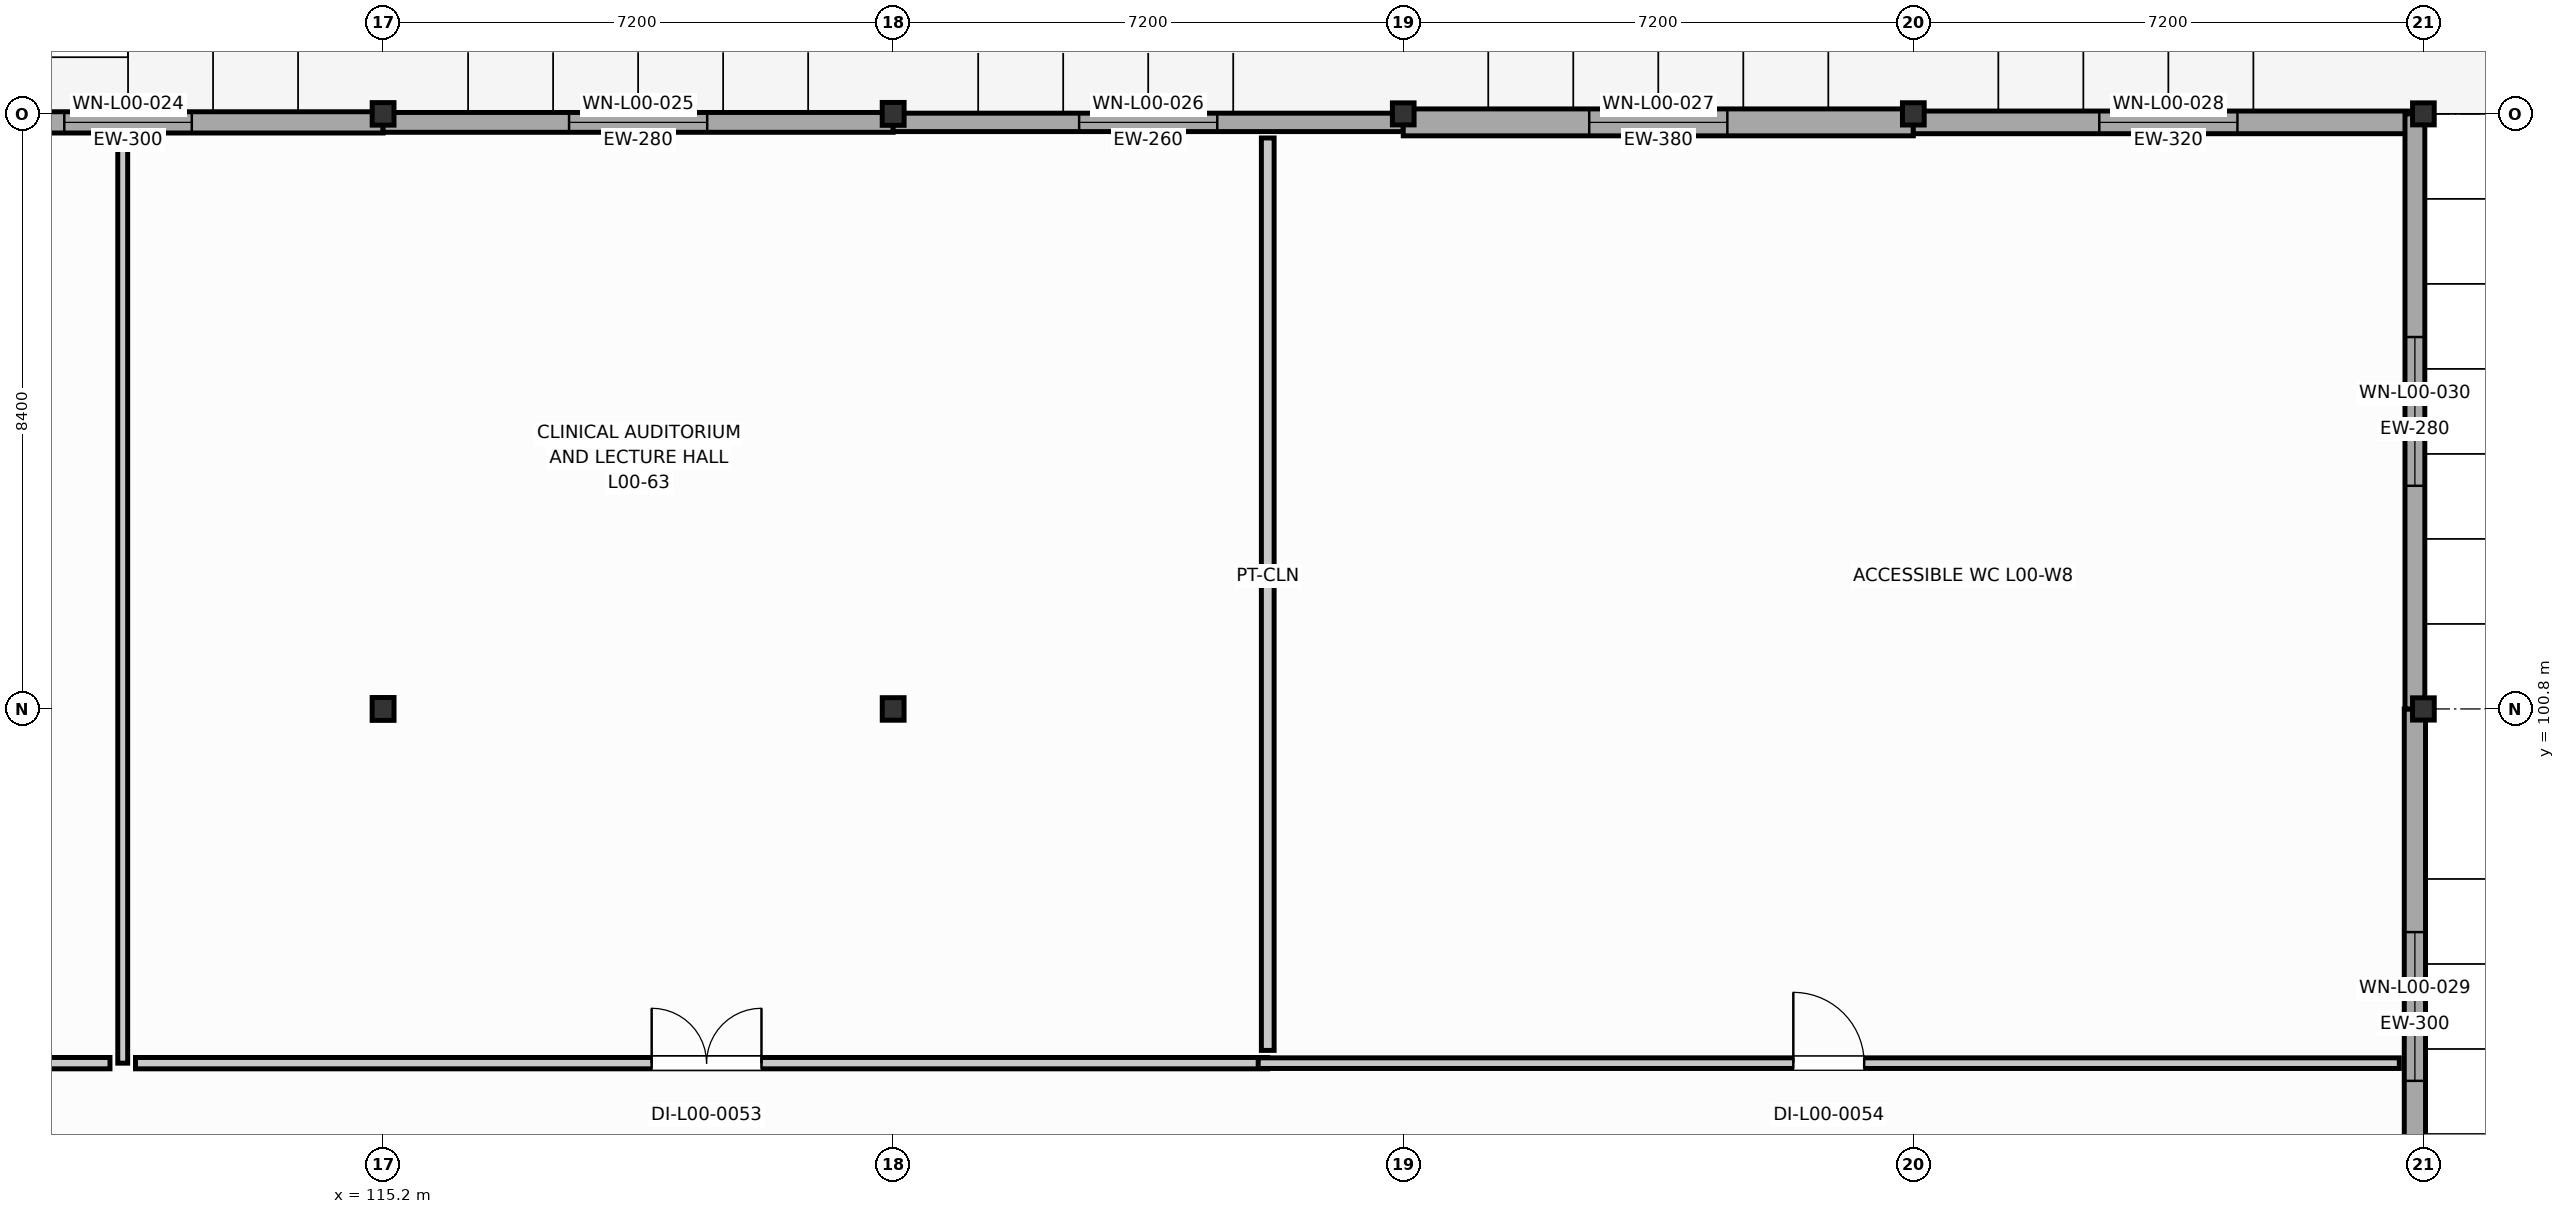
"""IFC4 building model, lengths in metres.
Left out: names, types, materials, properties, quantities, classifications, styles, units other than length and angle.
Written with IfcOpenShell. Run it as: python <this file> out.ifc"""

import sys

from ifc_helpers import new_model, si_unit, direction, frame, frame_2d, origin, origin_2d, place, context, subcontext, project, spatial, rectangle, i_section, extrude, element, fill, save


model = new_model("IFC4")
c1 = context("Model", 3, precision=1e-05, world=origin(), true_north=direction((0.0, 1.0)))
c2 = subcontext(c1, "Body", "Model", "MODEL_VIEW")
j1 = project(units=[si_unit("LENGTHUNIT", "METRE"), si_unit("PLANEANGLEUNIT", "RADIAN")], contexts=[c1])
p1 = place(None, origin())
s1 = spatial("IfcSite", under=j1, at=p1, CompositionType="ELEMENT")
p2 = place(p1, origin())
s2 = spatial("IfcBuilding", under=s1, at=p2, CompositionType="ELEMENT")
p3 = place(p2, origin())
s3 = spatial("IfcBuildingStorey", under=s2, at=p3, CompositionType="ELEMENT", Elevation=0.0)
p4 = place(p3, frame((115.2, 100.8, 0.0), z_axis=(0.0, 0.0, 1.0), x_axis=(1.0, 0.0, 0.0)))
e1 = element("IfcColumn", 1, at=p4, inside=s3, PredefinedType="COLUMN", context=c2, shape_type="SweptSolid", body=[
    extrude(i_section(OverallWidth=0.309, OverallDepth=0.323, WebThickness=0.014, FlangeThickness=0.023, FilletRadius=0.016, at=origin_2d()), origin(), (0.0, 0.0, 1.0), 4.8),
])
for number, where, z_axis, x_axis in (
    (2, (115.2, 109.2, 0.0), (0.0, 0.0, 1.0), (1.0, 0.0, 0.0)),
    (3, (122.4, 100.8, 0.0), (0.0, 0.0, 1.0), (1.0, 0.0, 0.0)),
):
    element("IfcColumn", number, at=place(p3, frame(where, z_axis=z_axis, x_axis=x_axis)), inside=s3, PredefinedType="COLUMN", context=c2, shape_type="SweptSolid", body=[
        extrude(i_section(OverallWidth=0.308, OverallDepth=0.318, WebThickness=0.013, FlangeThickness=0.021, FilletRadius=0.016, at=origin_2d()), origin(), (0.0, 0.0, 1.0), 4.8),
    ])
p5 = place(p3, frame((122.4, 109.2, 0.0), z_axis=(0.0, 0.0, 1.0), x_axis=(1.0, 0.0, 0.0)))
e4 = element("IfcColumn", 4, at=p5, inside=s3, PredefinedType="COLUMN", context=c2, shape_type="SweptSolid", body=[
    extrude(i_section(OverallWidth=0.309, OverallDepth=0.323, WebThickness=0.014, FlangeThickness=0.023, FilletRadius=0.016, at=origin_2d()), origin(), (0.0, 0.0, 1.0), 4.8),
])
p6 = place(p3, frame((129.6, 109.2, 0.0), z_axis=(0.0, 0.0, 1.0), x_axis=(1.0, 0.0, 0.0)))
e5 = element("IfcColumn", 5, at=p6, inside=s3, PredefinedType="COLUMN", context=c2, shape_type="SweptSolid", body=[
    extrude(i_section(OverallWidth=0.306, OverallDepth=0.311, WebThickness=0.011, FlangeThickness=0.017, FilletRadius=0.015, at=origin_2d()), origin(), (0.0, 0.0, 1.0), 4.8),
])
for number, where, z_axis, x_axis in (
    (6, (136.8, 109.2, 0.0), (0.0, 0.0, 1.0), (1.0, 0.0, 0.0)),
    (7, (144.0, 100.8, 0.0), (0.0, 0.0, 1.0), (1.0, 0.0, 0.0)),
):
    element("IfcColumn", number, at=place(p3, frame(where, z_axis=z_axis, x_axis=x_axis)), inside=s3, PredefinedType="COLUMN", context=c2, shape_type="SweptSolid", body=[
        extrude(i_section(OverallWidth=0.307, OverallDepth=0.314, WebThickness=0.012, FlangeThickness=0.019, FilletRadius=0.016, at=origin_2d()), origin(), (0.0, 0.0, 1.0), 4.8),
    ])
p7 = place(p3, frame((144.0, 109.2, 0.0), z_axis=(0.0, 0.0, 1.0), x_axis=(1.0, 0.0, 0.0)))
e8 = element("IfcColumn", 8, at=p7, inside=s3, PredefinedType="COLUMN", context=c2, shape_type="SweptSolid", body=[
    extrude(i_section(OverallWidth=0.306, OverallDepth=0.311, WebThickness=0.011, FlangeThickness=0.017, FilletRadius=0.015, at=origin_2d()), origin(), (0.0, 0.0, 1.0), 4.8),
])
p8 = place(p3, frame((108.0, 109.08, 0.0), z_axis=(0.0, 0.0, 1.0), x_axis=(1.0, 0.0, 0.0)))
e9 = element("IfcWall", 9, at=p8, inside=s3, PredefinedType="SOLIDWALL", context=c2, shape_type="SweptSolid", body=[
    extrude(rectangle(XDim=7.2, YDim=0.3, at=frame_2d((3.6, 0.0))), origin(), (0.0, 0.0, 1.0), 4.082),
])
p9 = place(p8, frame((2.7, 0.0, 0.95)))
e10 = element("IfcOpeningElement", 10, at=p9, cuts=e9, PredefinedType="OPENING", context=c2, shape_type="SweptSolid", body=[
    extrude(rectangle(XDim=1.8, YDim=1.75, at=frame_2d((0.9, 0.875))), frame((0.0, 0.16, 0.0), z_axis=(0.0, -1.0, 0.0), x_axis=(1.0, 0.0, 0.0)), (0.0, 0.0, 1.0), 0.32),
])
p10 = place(p3, frame((115.2, 109.08, 0.0), z_axis=(0.0, 0.0, 1.0), x_axis=(1.0, 0.0, 0.0)))
e11 = element("IfcWall", 11, at=p10, inside=s3, PredefinedType="SOLIDWALL", context=c2, shape_type="SweptSolid", body=[
    extrude(rectangle(XDim=7.2, YDim=0.28, at=frame_2d((3.6, 0.0))), origin(), (0.0, 0.0, 1.0), 4.082),
])
p11 = place(p10, frame((2.625, 0.0, 0.95)))
e12 = element("IfcOpeningElement", 12, at=p11, cuts=e11, PredefinedType="OPENING", context=c2, shape_type="SweptSolid", body=[
    extrude(rectangle(XDim=1.95, YDim=1.15, at=frame_2d((0.975, 0.575))), frame((0.0, 0.15, 0.0), z_axis=(0.0, -1.0, 0.0), x_axis=(1.0, 0.0, 0.0)), (0.0, 0.0, 1.0), 0.3),
])
p12 = place(p3, frame((122.4, 109.08, 0.0), z_axis=(0.0, 0.0, 1.0), x_axis=(1.0, 0.0, 0.0)))
e13 = element("IfcWall", 13, at=p12, inside=s3, PredefinedType="SOLIDWALL", context=c2, shape_type="SweptSolid", body=[
    extrude(rectangle(XDim=7.2, YDim=0.26, at=frame_2d((3.6, 0.0))), origin(), (0.0, 0.0, 1.0), 4.082),
])
p13 = place(p12, frame((2.625, 0.0, 0.95)))
e14 = element("IfcOpeningElement", 14, at=p13, cuts=e13, PredefinedType="OPENING", context=c2, shape_type="SweptSolid", body=[
    extrude(rectangle(XDim=1.95, YDim=1.35, at=frame_2d((0.975, 0.675))), frame((0.0, 0.14, 0.0), z_axis=(0.0, -1.0, 0.0), x_axis=(1.0, 0.0, 0.0)), (0.0, 0.0, 1.0), 0.28),
])
p14 = place(p3, frame((129.6, 109.08, 0.0), z_axis=(0.0, 0.0, 1.0), x_axis=(1.0, 0.0, 0.0)))
e15 = element("IfcWall", 15, at=p14, inside=s3, PredefinedType="SOLIDWALL", context=c2, shape_type="SweptSolid", body=[
    extrude(rectangle(XDim=7.2, YDim=0.38, at=frame_2d((3.6, 0.0))), origin(), (0.0, 0.0, 1.0), 4.082),
])
p15 = place(p14, frame((2.625, 0.0, 0.95)))
e16 = element("IfcOpeningElement", 16, at=p15, cuts=e15, PredefinedType="OPENING", context=c2, shape_type="SweptSolid", body=[
    extrude(rectangle(XDim=1.95, YDim=1.55, at=frame_2d((0.975, 0.775))), frame((0.0, 0.2, 0.0), z_axis=(0.0, -1.0, 0.0), x_axis=(1.0, 0.0, 0.0)), (0.0, 0.0, 1.0), 0.4),
])
p16 = place(p3, frame((136.8, 109.08, 0.0), z_axis=(0.0, 0.0, 1.0), x_axis=(1.0, 0.0, 0.0)))
e17 = element("IfcWall", 17, at=p16, inside=s3, PredefinedType="SOLIDWALL", context=c2, shape_type="SweptSolid", body=[
    extrude(rectangle(XDim=7.2, YDim=0.32, at=frame_2d((3.6, 0.0))), origin(), (0.0, 0.0, 1.0), 4.082),
])
p17 = place(p16, frame((2.625, 0.0, 0.95)))
e18 = element("IfcOpeningElement", 18, at=p17, cuts=e17, PredefinedType="OPENING", context=c2, shape_type="SweptSolid", body=[
    extrude(rectangle(XDim=1.95, YDim=1.75, at=frame_2d((0.975, 0.875))), frame((0.0, 0.17, 0.0), z_axis=(0.0, -1.0, 0.0), x_axis=(1.0, 0.0, 0.0)), (0.0, 0.0, 1.0), 0.34),
])
p18 = place(p3, frame((143.88, 92.4, 0.0), z_axis=(0.0, 0.0, 1.0), x_axis=(0.0, 1.0, 0.0)))
e19 = element("IfcWall", 19, at=p18, inside=s3, PredefinedType="SOLIDWALL", context=c2, shape_type="SweptSolid", body=[
    extrude(rectangle(XDim=8.4, YDim=0.3, at=frame_2d((4.2, 0.0))), origin(), (0.0, 0.0, 1.0), 3.772),
])
p19 = place(p18, frame((3.15, 0.0, 0.95)))
e20 = element("IfcOpeningElement", 20, at=p19, cuts=e19, PredefinedType="OPENING", context=c2, shape_type="SweptSolid", body=[
    extrude(rectangle(XDim=2.1, YDim=1.15, at=frame_2d((1.05, 0.575))), frame((0.0, 0.16, 0.0), z_axis=(0.0, -1.0, 0.0), x_axis=(1.0, 0.0, 0.0)), (0.0, 0.0, 1.0), 0.32),
])
p20 = place(p3, frame((143.88, 100.8, 0.0), z_axis=(0.0, 0.0, 1.0), x_axis=(0.0, 1.0, 0.0)))
e21 = element("IfcWall", 21, at=p20, inside=s3, PredefinedType="SOLIDWALL", context=c2, shape_type="SweptSolid", body=[
    extrude(rectangle(XDim=8.4, YDim=0.28, at=frame_2d((4.2, 0.0))), origin(), (0.0, 0.0, 1.0), 3.849),
])
p21 = place(p20, frame((3.15, 0.0, 0.95)))
e22 = element("IfcOpeningElement", 22, at=p21, cuts=e21, PredefinedType="OPENING", context=c2, shape_type="SweptSolid", body=[
    extrude(rectangle(XDim=2.1, YDim=1.35, at=frame_2d((1.05, 0.675))), frame((0.0, 0.15, 0.0), z_axis=(0.0, -1.0, 0.0), x_axis=(1.0, 0.0, 0.0)), (0.0, 0.0, 1.0), 0.3),
])
p22 = place(p3, frame((111.525, 108.86, 0.0), z_axis=(0.0, 0.0, 1.0), x_axis=(0.0, -1.0, 0.0)))
e23 = element("IfcWall", 23, at=p22, inside=s3, PredefinedType="PARTITIONING", context=c2, shape_type="SweptSolid", body=[
    extrude(rectangle(XDim=13.06, YDim=0.14, at=frame_2d((6.53, 0.0))), origin(), (0.0, 0.0, 1.0), 4.132),
])
p23 = place(p3, frame((111.345, 95.8, 0.0), z_axis=(0.0, 0.0, 1.0), x_axis=(-1.0, 0.0, 0.0)))
e24 = element("IfcWall", 24, at=p23, inside=s3, PredefinedType="PARTITIONING", context=c2, shape_type="SweptSolid", body=[
    extrude(rectangle(XDim=15.802, YDim=0.16, at=frame_2d((7.901, 0.0))), origin(), (0.0, 0.0, 1.0), 3.775),
])
p24 = place(p23, frame((7.276, 0.0, 0.0)))
e25 = element("IfcOpeningElement", 25, at=p24, cuts=e24, PredefinedType="OPENING", context=c2, shape_type="SweptSolid", body=[
    extrude(rectangle(XDim=1.65, YDim=2.2, at=frame_2d((0.825, 1.1))), frame((0.0, 0.09, 0.0), z_axis=(0.0, -1.0, 0.0), x_axis=(1.0, 0.0, 0.0)), (0.0, 0.0, 1.0), 0.18),
])
p25 = place(p3, frame((127.688, 95.8, 0.0), z_axis=(0.0, 0.0, 1.0), x_axis=(-1.0, 0.0, 0.0)))
e26 = element("IfcWall", 26, at=p25, inside=s3, PredefinedType="PARTITIONING", context=c2, shape_type="SweptSolid", body=[
    extrude(rectangle(XDim=15.982, YDim=0.16, at=frame_2d((7.991, 0.0))), origin(), (0.0, 0.0, 1.0), 3.775),
])
p26 = place(p25, frame((7.146, 0.0, 0.0)))
e27 = element("IfcOpeningElement", 27, at=p26, cuts=e26, PredefinedType="OPENING", context=c2, shape_type="SweptSolid", body=[
    extrude(rectangle(XDim=1.55, YDim=2.2, at=frame_2d((0.775, 1.1))), frame((0.0, 0.09, 0.0), z_axis=(0.0, -1.0, 0.0), x_axis=(1.0, 0.0, 0.0)), (0.0, 0.0, 1.0), 0.18),
])
p27 = place(p3, frame((127.688, 108.86, 0.0), z_axis=(0.0, 0.0, 1.0), x_axis=(0.0, -1.0, 0.0)))
e28 = element("IfcWall", 28, at=p27, inside=s3, PredefinedType="PARTITIONING", context=c2, shape_type="SweptSolid", body=[
    extrude(rectangle(XDim=12.88, YDim=0.18, at=frame_2d((6.44, 0.0))), origin(), (0.0, 0.0, 1.0), 4.545),
])
p28 = place(p3, frame((143.66, 95.8, 0.0), z_axis=(0.0, 0.0, 1.0), x_axis=(-1.0, 0.0, 0.0)))
e29 = element("IfcWall", 29, at=p28, inside=s3, PredefinedType="PLUMBINGWALL", context=c2, shape_type="SweptSolid", body=[
    extrude(rectangle(XDim=16.107, YDim=0.15, at=frame_2d((8.054, 0.0))), origin(), (0.0, 0.0, 1.0), 3.618),
])
p29 = place(p28, frame((7.554, 0.0, 0.0)))
e30 = element("IfcOpeningElement", 30, at=p29, cuts=e29, PredefinedType="OPENING", context=c2, shape_type="SweptSolid", body=[
    extrude(rectangle(XDim=1.0, YDim=2.1, at=frame_2d((0.5, 1.05))), frame((0.0, 0.085, 0.0), z_axis=(0.0, -1.0, 0.0), x_axis=(1.0, 0.0, 0.0)), (0.0, 0.0, 1.0), 0.17),
])
p30 = place(p9, origin())
e31 = element("IfcWindow", 31, at=p30, inside=s3, PartitioningType="SINGLE_PANEL", PredefinedType="WINDOW", context=c2, shape_type="SweptSolid", body=[
    extrude(rectangle(XDim=1.8, YDim=1.75, at=frame_2d((0.9, 0.875))), frame((0.0, 0.03, 0.0), z_axis=(0.0, -1.0, 0.0), x_axis=(1.0, 0.0, 0.0)), (0.0, 0.0, 1.0), 0.06),
])
fill(e10, e31)
p31 = place(p11, origin())
e32 = element("IfcWindow", 32, at=p31, inside=s3, PartitioningType="SINGLE_PANEL", PredefinedType="WINDOW", context=c2, shape_type="SweptSolid", body=[
    extrude(rectangle(XDim=1.95, YDim=1.15, at=frame_2d((0.975, 0.575))), frame((0.0, 0.03, 0.0), z_axis=(0.0, -1.0, 0.0), x_axis=(1.0, 0.0, 0.0)), (0.0, 0.0, 1.0), 0.06),
])
fill(e12, e32)
p32 = place(p13, origin())
e33 = element("IfcWindow", 33, at=p32, inside=s3, PartitioningType="SINGLE_PANEL", PredefinedType="WINDOW", context=c2, shape_type="SweptSolid", body=[
    extrude(rectangle(XDim=1.95, YDim=1.35, at=frame_2d((0.975, 0.675))), frame((0.0, 0.03, 0.0), z_axis=(0.0, -1.0, 0.0), x_axis=(1.0, 0.0, 0.0)), (0.0, 0.0, 1.0), 0.06),
])
fill(e14, e33)
p33 = place(p15, origin())
e34 = element("IfcWindow", 34, at=p33, inside=s3, PartitioningType="SINGLE_PANEL", PredefinedType="WINDOW", context=c2, shape_type="SweptSolid", body=[
    extrude(rectangle(XDim=1.95, YDim=1.55, at=frame_2d((0.975, 0.775))), frame((0.0, 0.03, 0.0), z_axis=(0.0, -1.0, 0.0), x_axis=(1.0, 0.0, 0.0)), (0.0, 0.0, 1.0), 0.06),
])
fill(e16, e34)
p34 = place(p17, origin())
e35 = element("IfcWindow", 35, at=p34, inside=s3, PartitioningType="SINGLE_PANEL", PredefinedType="WINDOW", context=c2, shape_type="SweptSolid", body=[
    extrude(rectangle(XDim=1.95, YDim=1.75, at=frame_2d((0.975, 0.875))), frame((0.0, 0.03, 0.0), z_axis=(0.0, -1.0, 0.0), x_axis=(1.0, 0.0, 0.0)), (0.0, 0.0, 1.0), 0.06),
])
fill(e18, e35)
p35 = place(p19, origin())
e36 = element("IfcWindow", 36, at=p35, inside=s3, PartitioningType="SINGLE_PANEL", PredefinedType="WINDOW", context=c2, shape_type="SweptSolid", body=[
    extrude(rectangle(XDim=2.1, YDim=1.15, at=frame_2d((1.05, 0.575))), frame((0.0, 0.03, 0.0), z_axis=(0.0, -1.0, 0.0), x_axis=(1.0, 0.0, 0.0)), (0.0, 0.0, 1.0), 0.06),
])
fill(e20, e36)
p36 = place(p21, origin())
e37 = element("IfcWindow", 37, at=p36, inside=s3, PartitioningType="SINGLE_PANEL", PredefinedType="WINDOW", context=c2, shape_type="SweptSolid", body=[
    extrude(rectangle(XDim=2.1, YDim=1.35, at=frame_2d((1.05, 0.675))), frame((0.0, 0.03, 0.0), z_axis=(0.0, -1.0, 0.0), x_axis=(1.0, 0.0, 0.0)), (0.0, 0.0, 1.0), 0.06),
])
fill(e22, e37)
p37 = place(p26, frame((1.55, 0.0, 0.0), z_axis=(0.0, 0.0, 1.0), x_axis=(-1.0, 0.0, 0.0)))
e38 = element("IfcDoor", 38, at=p37, inside=s3, OperationType="DOUBLE_DOOR_SINGLE_SWING", PredefinedType="DOOR", context=c2, shape_type="SweptSolid", body=[
    extrude(rectangle(XDim=1.55, YDim=2.2, at=frame_2d((0.775, 1.1))), frame((0.0, 0.025, 0.0), z_axis=(0.0, -1.0, 0.0), x_axis=(1.0, 0.0, 0.0)), (0.0, 0.0, 1.0), 0.05),
])
fill(e27, e38)
p38 = place(p29, frame((1.0, 0.0, 0.0), z_axis=(0.0, 0.0, 1.0), x_axis=(-1.0, 0.0, 0.0)))
e39 = element("IfcDoor", 39, at=p38, inside=s3, OperationType="SINGLE_SWING_LEFT", PredefinedType="DOOR", context=c2, shape_type="SweptSolid", body=[
    extrude(rectangle(XDim=1.0, YDim=2.1, at=frame_2d((0.5, 1.05))), frame((0.0, 0.025, 0.0), z_axis=(0.0, -1.0, 0.0), x_axis=(1.0, 0.0, 0.0)), (0.0, 0.0, 1.0), 0.05),
])
fill(e30, e39)
save(model, sys.argv[1])
